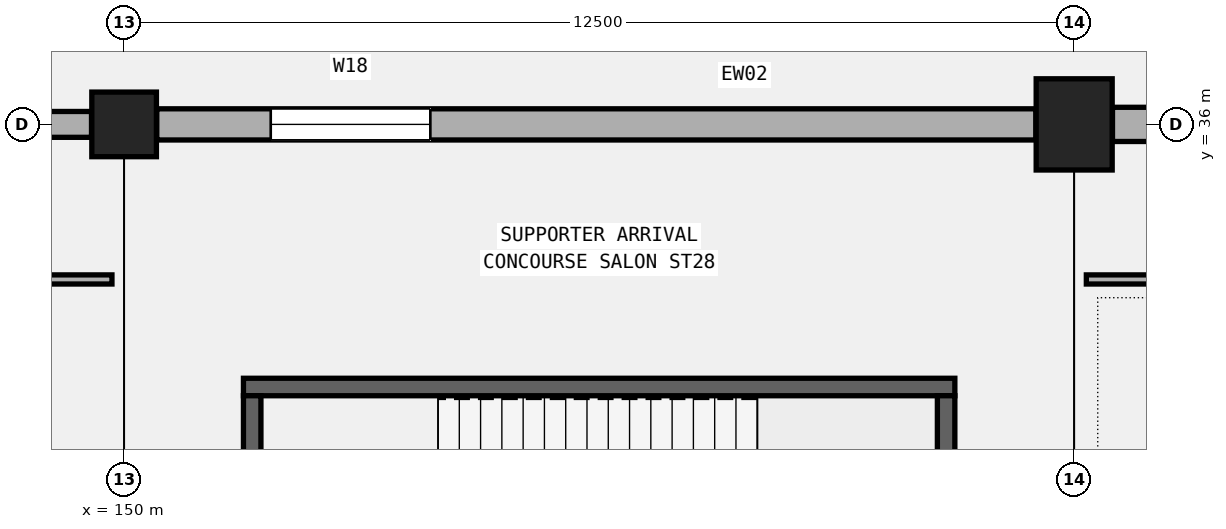
"""IFC4 building model, lengths in metres.
Left out: names, types, materials, properties, quantities, classifications, styles, units other than length and angle.
Written with IfcOpenShell. Run it as: python <this file> out.ifc"""

import sys

from ifc_helpers import new_model, si_unit, direction, frame, frame_2d, origin, origin_2d, place, context, subcontext, project, spatial, rectangle, circle, extrude, element, fill, save


model = new_model("IFC4")
c1 = context("Model", 3, precision=1e-05, world=origin(), true_north=direction((0.0, 1.0)))
c2 = subcontext(c1, "Body", "Model", "MODEL_VIEW")
j1 = project(units=[si_unit("LENGTHUNIT", "METRE"), si_unit("PLANEANGLEUNIT", "RADIAN")], contexts=[c1])
p1 = place(None, origin())
s1 = spatial("IfcSite", under=j1, at=p1, CompositionType="ELEMENT")
p2 = place(p1, origin())
s2 = spatial("IfcBuilding", under=s1, at=p2, CompositionType="ELEMENT")
p3 = place(p2, origin())
s3 = spatial("IfcBuildingStorey", under=s2, at=p3, CompositionType="ELEMENT", Elevation=0.0)
p4 = place(p3, frame((150.0, 36.0, 0.0), z_axis=(0.0, 0.0, 1.0), x_axis=(1.0, 0.0, 0.0)))
e1 = element("IfcColumn", 1, at=p4, inside=s3, PredefinedType="COLUMN", context=c2, shape_type="SweptSolid", body=[
    extrude(circle(Radius=0.425, at=origin_2d()), origin(), (0.0, 0.0, 1.0), 5.4),
])
p5 = place(p3, frame((162.5, 36.0, 0.0), z_axis=(0.0, 0.0, 1.0), x_axis=(1.0, 0.0, 0.0)))
e2 = element("IfcColumn", 2, at=p5, inside=s3, PredefinedType="COLUMN", context=c2, shape_type="SweptSolid", body=[
    extrude(rectangle(XDim=1.0, YDim=1.2, at=origin_2d()), origin(), (0.0, 0.0, 1.0), 5.4),
])
p6 = place(p3, frame((137.904, 36.0, 0.0), z_axis=(0.0, 0.0, 1.0), x_axis=(1.0, 0.0, 0.0)))
e3 = element("IfcWall", 3, at=p6, inside=s3, PredefinedType="SOLIDWALL", context=c2, shape_type="SweptSolid", body=[
    extrude(rectangle(XDim=11.667, YDim=0.34, at=frame_2d((5.833, 0.0))), origin(), (0.0, 0.0, 1.0), 4.24),
])
p7 = place(p6, frame((1.5, 0.0, 0.95)))
e4 = element("IfcOpeningElement", 4, at=p7, cuts=e3, PredefinedType="OPENING", context=c2, shape_type="SweptSolid", body=[
    extrude(rectangle(XDim=1.95, YDim=1.9, at=frame_2d((0.975, 0.95))), frame((0.0, 0.18, 0.0), z_axis=(0.0, -1.0, 0.0), x_axis=(1.0, 0.0, 0.0)), (0.0, 0.0, 1.0), 0.36),
])
p8 = place(p3, frame((150.429, 36.0, 0.0), z_axis=(0.0, 0.0, 1.0), x_axis=(1.0, 0.0, 0.0)))
e5 = element("IfcWall", 5, at=p8, inside=s3, PredefinedType="SOLIDWALL", context=c2, shape_type="SweptSolid", body=[
    extrude(rectangle(XDim=11.567, YDim=0.41, at=frame_2d((5.784, 0.0))), origin(), (0.0, 0.0, 1.0), 4.34),
])
p9 = place(p8, frame((1.5, 0.0, 0.95)))
e6 = element("IfcOpeningElement", 6, at=p9, cuts=e5, PredefinedType="OPENING", context=c2, shape_type="SweptSolid", body=[
    extrude(rectangle(XDim=2.1, YDim=1.85, at=frame_2d((1.05, 0.925))), frame((0.0, 0.215, 0.0), z_axis=(0.0, -1.0, 0.0), x_axis=(1.0, 0.0, 0.0)), (0.0, 0.0, 1.0), 0.43),
])
p10 = place(p3, frame((163.004, 36.0, 0.0), z_axis=(0.0, 0.0, 1.0), x_axis=(1.0, 0.0, 0.0)))
e7 = element("IfcWall", 7, at=p10, inside=s3, PredefinedType="SOLIDWALL", context=c2, shape_type="SweptSolid", body=[
    extrude(rectangle(XDim=11.542, YDim=0.45, at=frame_2d((5.771, 0.0))), origin(), (0.0, 0.0, 1.0), 4.09),
])
p11 = place(p10, frame((1.5, 0.0, 0.95)))
e8 = element("IfcOpeningElement", 8, at=p11, cuts=e7, PredefinedType="OPENING", context=c2, shape_type="SweptSolid", body=[
    extrude(rectangle(XDim=2.25, YDim=2.2, at=frame_2d((1.125, 1.1))), frame((0.0, 0.235, 0.0), z_axis=(0.0, -1.0, 0.0), x_axis=(1.0, 0.0, 0.0)), (0.0, 0.0, 1.0), 0.47),
])
p12 = place(p3, frame((151.57, 32.545, 0.0), z_axis=(0.0, 0.0, 1.0), x_axis=(1.0, 0.0, 0.0)))
e9 = element("IfcWall", 9, at=p12, inside=s3, PredefinedType="SHEAR", context=c2, shape_type="SweptSolid", body=[
    extrude(rectangle(XDim=9.36, YDim=0.23, at=frame_2d((4.68, 0.0))), origin(), (0.0, 0.0, 1.0), 5.14),
])
for number, where, z_axis, x_axis in (
    (10, (151.685, 27.57, 0.0), (0.0, 0.0, 1.0), (0.0, 1.0, 0.0)),
    (11, (160.815, 27.57, 0.0), (0.0, 0.0, 1.0), (0.0, 1.0, 0.0)),
):
    element("IfcWall", number, at=place(p3, frame(where, z_axis=z_axis, x_axis=x_axis)), inside=s3, PredefinedType="SHEAR", context=c2, shape_type="SweptSolid", body=[
        extrude(rectangle(XDim=4.86, YDim=0.23, at=frame_2d((2.43, 0.0))), origin(), (0.0, 0.0, 1.0), 5.14),
    ])
p13 = place(p3, frame((139.47, 33.96, 0.0), z_axis=(0.0, 0.0, 1.0), x_axis=(1.0, 0.0, 0.0)))
e12 = element("IfcWall", 12, at=p13, inside=s3, PredefinedType="PARTITIONING", context=c2, shape_type="SweptSolid", body=[
    extrude(rectangle(XDim=10.37, YDim=0.12, at=frame_2d((5.185, 0.0))), origin(), (0.0, 0.0, 1.0), 4.52),
])
p14 = place(p13, frame((3.354, 0.0, 0.0), z_axis=(0.0, 0.0, 1.0), x_axis=(-1.0, 0.0, 0.0)))
e13 = element("IfcOpeningElement", 13, at=p14, cuts=e12, PredefinedType="OPENING", context=c2, shape_type="SweptSolid", body=[
    extrude(rectangle(XDim=1.24, YDim=2.22, at=frame_2d((0.62, 1.11))), frame((0.0, 0.07, 0.0), z_axis=(0.0, -1.0, 0.0), x_axis=(1.0, 0.0, 0.0)), (0.0, 0.0, 1.0), 0.14),
])
p15 = place(p13, frame((8.634, 0.0, 0.0), z_axis=(0.0, 0.0, 1.0), x_axis=(-1.0, 0.0, 0.0)))
e14 = element("IfcOpeningElement", 14, at=p15, cuts=e12, PredefinedType="OPENING", context=c2, shape_type="SweptSolid", body=[
    extrude(rectangle(XDim=1.27, YDim=2.2, at=frame_2d((0.635, 1.1))), frame((0.0, 0.07, 0.0), z_axis=(0.0, -1.0, 0.0), x_axis=(1.0, 0.0, 0.0)), (0.0, 0.0, 1.0), 0.14),
])
p16 = place(p3, frame((162.66, 33.96, 0.0), z_axis=(0.0, 0.0, 1.0), x_axis=(1.0, 0.0, 0.0)))
e15 = element("IfcWall", 15, at=p16, inside=s3, PredefinedType="PARTITIONING", context=c2, shape_type="SweptSolid", body=[
    extrude(rectangle(XDim=12.18, YDim=0.12, at=frame_2d((6.09, 0.0))), origin(), (0.0, 0.0, 1.0), 4.52),
])
p17 = place(p16, frame((6.915, 0.0, 0.0), z_axis=(0.0, 0.0, 1.0), x_axis=(-1.0, 0.0, 0.0)))
e16 = element("IfcOpeningElement", 16, at=p17, cuts=e15, PredefinedType="OPENING", context=c2, shape_type="SweptSolid", body=[
    extrude(rectangle(XDim=1.65, YDim=2.28, at=frame_2d((0.825, 1.14))), frame((0.0, 0.07, 0.0), z_axis=(0.0, -1.0, 0.0), x_axis=(1.0, 0.0, 0.0)), (0.0, 0.0, 1.0), 0.14),
])
p18 = place(p9, origin())
e17 = element("IfcWindow", 17, at=p18, inside=s3, PartitioningType="SINGLE_PANEL", PredefinedType="WINDOW", context=c2, shape_type="SweptSolid", body=[
    extrude(rectangle(XDim=2.1, YDim=1.85, at=frame_2d((1.05, 0.925))), frame((0.0, 0.03, 0.0), z_axis=(0.0, -1.0, 0.0), x_axis=(1.0, 0.0, 0.0)), (0.0, 0.0, 1.0), 0.06),
])
fill(e6, e17)
save(model, sys.argv[1])
